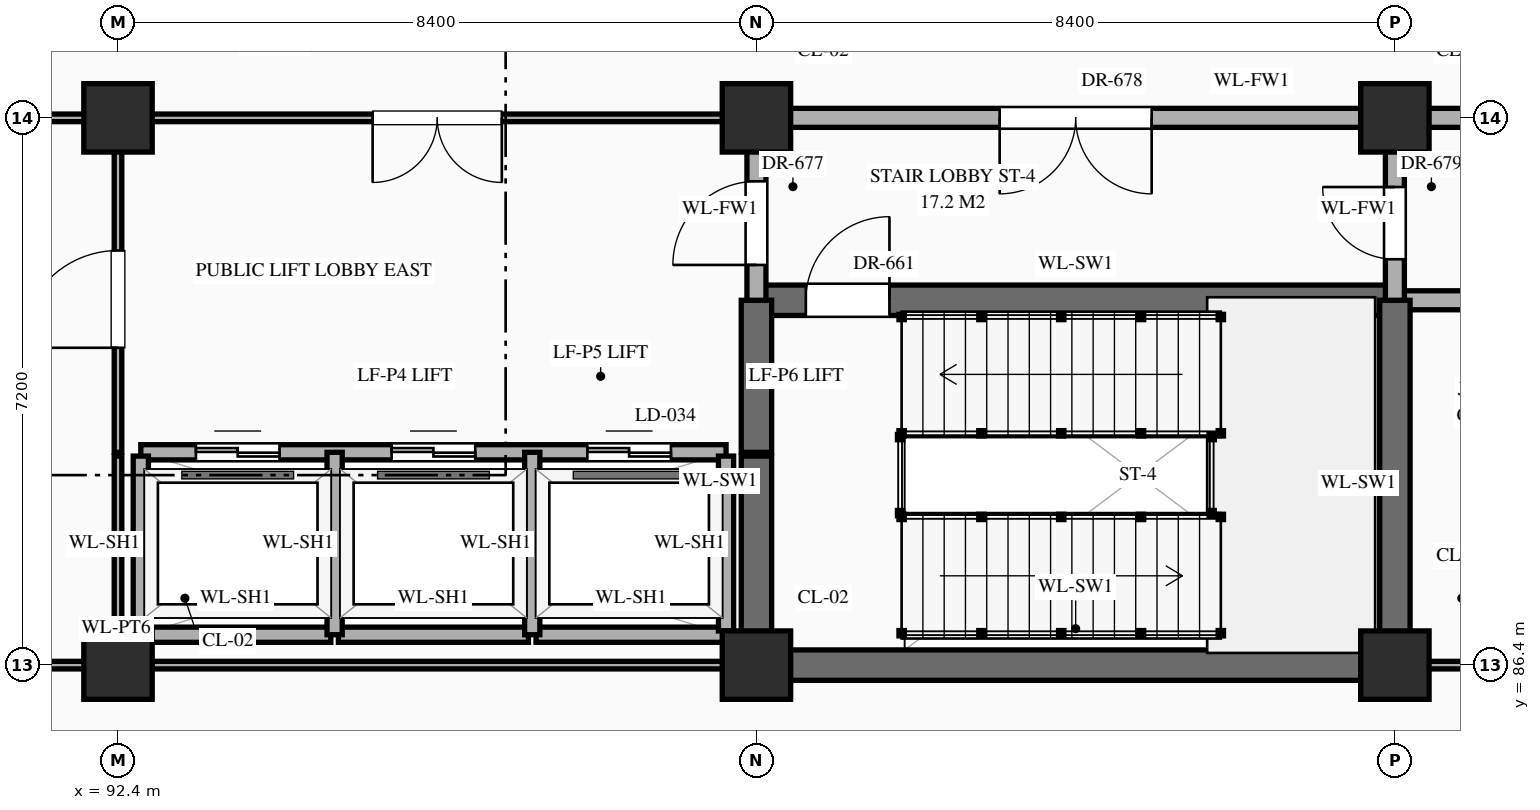
"""IFC4 building model, lengths in metres.
Left out: names, types, materials, properties, quantities, classifications, styles, units other than length and angle.
Written with IfcOpenShell. Run it as: python <this file> out.ifc"""

import sys

from ifc_helpers import new_model, si_unit, direction, frame, frame_2d, origin, origin_2d, place, context, subcontext, project, spatial, rectangle, extrude, element, fill, save


model = new_model("IFC4")
c1 = context("Model", 3, precision=1e-05, world=origin(), true_north=direction((0.0, 1.0)))
c2 = subcontext(c1, "Body", "Model", "MODEL_VIEW")
j1 = project(units=[si_unit("LENGTHUNIT", "METRE"), si_unit("PLANEANGLEUNIT", "RADIAN")], contexts=[c1])
p1 = place(None, origin())
s1 = spatial("IfcSite", under=j1, at=p1, CompositionType="ELEMENT")
p2 = place(p1, origin())
s2 = spatial("IfcBuilding", under=s1, at=p2, CompositionType="ELEMENT")
p3 = place(p2, origin())
s3 = spatial("IfcBuildingStorey", under=s2, at=p3, CompositionType="ELEMENT", Elevation=0.0)
for number, where, z_axis, x_axis in (
    (1, (92.4, 86.4, 0.0), (0.0, 0.0, 1.0), (1.0, 0.0, 0.0)),
    (2, (92.4, 93.6, 0.0), (0.0, 0.0, 1.0), (1.0, 0.0, 0.0)),
    (3, (100.8, 86.4, 0.0), (0.0, 0.0, 1.0), (1.0, 0.0, 0.0)),
    (4, (100.8, 93.6, 0.0), (0.0, 0.0, 1.0), (1.0, 0.0, 0.0)),
    (5, (109.2, 86.4, 0.0), (0.0, 0.0, 1.0), (1.0, 0.0, 0.0)),
    (6, (109.2, 93.6, 0.0), (0.0, 0.0, 1.0), (1.0, 0.0, 0.0)),
):
    element("IfcColumn", number, at=place(p3, frame(where, z_axis=z_axis, x_axis=x_axis)), inside=s3, PredefinedType="COLUMN", context=c2, shape_type="SweptSolid", body=[
        extrude(rectangle(XDim=0.9, YDim=0.9, at=origin_2d()), origin(), (0.0, 0.0, 1.0), 5.4),
    ])
p4 = place(p3, frame((84.0, 86.4, 0.0), z_axis=(0.0, 0.0, 1.0), x_axis=(1.0, 0.0, 0.0)))
e7 = element("IfcWall", 7, at=p4, inside=s3, PredefinedType="STANDARD", context=c2, shape_type="SweptSolid", body=[
    extrude(rectangle(XDim=8.4, YDim=0.1, at=frame_2d((4.2, 0.0))), origin(), (0.0, 0.0, 1.0), 4.27),
])
p5 = place(p4, frame((1.025, 0.0, 0.0)))
e8 = element("IfcOpeningElement", 8, at=p5, cuts=e7, PredefinedType="OPENING", context=c2, shape_type="SweptSolid", body=[
    extrude(rectangle(XDim=1.12, YDim=2.25, at=frame_2d((0.56, 1.125))), frame((0.0, 0.062, 0.0), z_axis=(0.0, -1.0, 0.0), x_axis=(1.0, 0.0, 0.0)), (0.0, 0.0, 1.0), 0.124),
])
p6 = place(p4, frame((3.6, 0.0, 0.0)))
e9 = element("IfcOpeningElement", 9, at=p6, cuts=e7, PredefinedType="OPENING", context=c2, shape_type="SweptSolid", body=[
    extrude(rectangle(XDim=1.2, YDim=2.35, at=frame_2d((0.6, 1.175))), frame((0.0, 0.062, 0.0), z_axis=(0.0, -1.0, 0.0), x_axis=(1.0, 0.0, 0.0)), (0.0, 0.0, 1.0), 0.124),
])
p7 = place(p4, frame((6.195, 0.0, 0.0)))
e10 = element("IfcOpeningElement", 10, at=p7, cuts=e7, PredefinedType="OPENING", context=c2, shape_type="SweptSolid", body=[
    extrude(rectangle(XDim=1.24, YDim=2.3, at=frame_2d((0.62, 1.15))), frame((0.0, 0.062, 0.0), z_axis=(0.0, -1.0, 0.0), x_axis=(1.0, 0.0, 0.0)), (0.0, 0.0, 1.0), 0.124),
])
p8 = place(p3, frame((92.45, 86.4, 0.0), z_axis=(0.0, 0.0, 1.0), x_axis=(1.0, 0.0, 0.0)))
e11 = element("IfcWall", 11, at=p8, inside=s3, PredefinedType="STANDARD", context=c2, shape_type="SweptSolid", body=[
    extrude(rectangle(XDim=8.3, YDim=0.1, at=frame_2d((4.15, 0.0))), origin(), (0.0, 0.0, 1.0), 4.27),
])
p9 = place(p3, frame((100.8, 86.4, 0.0), z_axis=(0.0, 0.0, 1.0), x_axis=(1.0, 0.0, 0.0)))
e12 = element("IfcWall", 12, at=p9, inside=s3, PredefinedType="SHEAR", context=c2, shape_type="SweptSolid", body=[
    extrude(rectangle(XDim=8.4, YDim=0.4, at=frame_2d((4.2, 0.0))), origin(), (0.0, 0.0, 1.0), 5.12),
])
p10 = place(p3, frame((109.2, 86.4, 0.0), z_axis=(0.0, 0.0, 1.0), x_axis=(1.0, 0.0, 0.0)))
e13 = element("IfcWall", 13, at=p10, inside=s3, PredefinedType="STANDARD", context=c2, shape_type="SweptSolid", body=[
    extrude(rectangle(XDim=2.8, YDim=0.1, at=frame_2d((1.4, 0.0))), origin(), (0.0, 0.0, 1.0), 4.27),
])
p11 = place(p10, frame((0.945, 0.0, 0.0)))
e14 = element("IfcOpeningElement", 14, at=p11, cuts=e13, PredefinedType="OPENING", context=c2, shape_type="SweptSolid", body=[
    extrude(rectangle(XDim=1.28, YDim=2.35, at=frame_2d((0.64, 1.175))), frame((0.0, 0.062, 0.0), z_axis=(0.0, -1.0, 0.0), x_axis=(1.0, 0.0, 0.0)), (0.0, 0.0, 1.0), 0.124),
])
for number, where, z_axis, x_axis in (
    (15, (92.7, 86.8, 0.0), (0.0, 0.0, 1.0), (1.0, 0.0, 0.0)),
    (16, (95.3, 86.8, 0.0), (0.0, 0.0, 1.0), (1.0, 0.0, 0.0)),
    (17, (97.9, 86.8, 0.0), (0.0, 0.0, 1.0), (1.0, 0.0, 0.0)),
):
    element("IfcWall", number, at=place(p3, frame(where, z_axis=z_axis, x_axis=x_axis)), inside=s3, PredefinedType="STANDARD", context=c2, shape_type="SweptSolid", body=[
        extrude(rectangle(XDim=2.5, YDim=0.2, at=frame_2d((1.25, 0.0))), origin(), (0.0, 0.0, 1.0), 5.12),
    ])
p12 = place(p3, frame((92.7, 89.2, 0.0), z_axis=(0.0, 0.0, 1.0), x_axis=(1.0, 0.0, 0.0)))
e18 = element("IfcWall", 18, at=p12, inside=s3, PredefinedType="STANDARD", context=c2, shape_type="SweptSolid", body=[
    extrude(rectangle(XDim=7.7, YDim=0.2, at=frame_2d((3.85, 0.0))), origin(), (0.0, 0.0, 1.0), 5.12),
])
p13 = place(p12, frame((0.725, 0.0, 0.0)))
e19 = element("IfcOpeningElement", 19, at=p13, cuts=e18, PredefinedType="OPENING", context=c2, shape_type="SweptSolid", body=[
    extrude(rectangle(XDim=1.1, YDim=2.15, at=frame_2d((0.55, 1.075))), frame((0.0, 0.112, 0.0), z_axis=(0.0, -1.0, 0.0), x_axis=(1.0, 0.0, 0.0)), (0.0, 0.0, 1.0), 0.224),
])
p14 = place(p12, frame((3.3, 0.0, 0.0)))
e20 = element("IfcOpeningElement", 20, at=p14, cuts=e18, PredefinedType="OPENING", context=c2, shape_type="SweptSolid", body=[
    extrude(rectangle(XDim=1.1, YDim=2.15, at=frame_2d((0.55, 1.075))), frame((0.0, 0.112, 0.0), z_axis=(0.0, -1.0, 0.0), x_axis=(1.0, 0.0, 0.0)), (0.0, 0.0, 1.0), 0.224),
])
p15 = place(p12, frame((5.875, 0.0, 0.0)))
e21 = element("IfcOpeningElement", 21, at=p15, cuts=e18, PredefinedType="OPENING", context=c2, shape_type="SweptSolid", body=[
    extrude(rectangle(XDim=1.1, YDim=2.15, at=frame_2d((0.55, 1.075))), frame((0.0, 0.112, 0.0), z_axis=(0.0, -1.0, 0.0), x_axis=(1.0, 0.0, 0.0)), (0.0, 0.0, 1.0), 0.224),
])
p16 = place(p3, frame((100.8, 91.2, 0.0), z_axis=(0.0, 0.0, 1.0), x_axis=(1.0, 0.0, 0.0)))
e22 = element("IfcWall", 22, at=p16, inside=s3, PredefinedType="SHEAR", context=c2, shape_type="SweptSolid", body=[
    extrude(rectangle(XDim=8.4, YDim=0.4, at=frame_2d((4.2, 0.0))), origin(), (0.0, 0.0, 1.0), 5.12),
])
p17 = place(p16, frame((0.65, 0.0, 0.0)))
e23 = element("IfcOpeningElement", 23, at=p17, cuts=e22, PredefinedType="OPENING", context=c2, shape_type="SweptSolid", body=[
    extrude(rectangle(XDim=1.1, YDim=2.2, at=frame_2d((0.55, 1.1))), frame((0.0, 0.212, 0.0), z_axis=(0.0, -1.0, 0.0), x_axis=(1.0, 0.0, 0.0)), (0.0, 0.0, 1.0), 0.424),
])
p18 = place(p3, frame((109.2, 91.2, 0.0), z_axis=(0.0, 0.0, 1.0), x_axis=(1.0, 0.0, 0.0)))
e24 = element("IfcWall", 24, at=p18, inside=s3, PredefinedType="STANDARD", context=c2, shape_type="SweptSolid", body=[
    extrude(rectangle(XDim=2.8, YDim=0.25, at=frame_2d((1.4, 0.0))), origin(), (0.0, 0.0, 1.0), 5.12),
])
p19 = place(p3, frame((67.2, 93.6, 0.0), z_axis=(0.0, 0.0, 1.0), x_axis=(1.0, 0.0, 0.0)))
e25 = element("IfcWall", 25, at=p19, inside=s3, PredefinedType="STANDARD", context=c2, shape_type="SweptSolid", body=[
    extrude(rectangle(XDim=33.6, YDim=0.1, at=frame_2d((16.8, 0.0))), origin(), (0.0, 0.0, 1.0), 4.27),
])
p20 = place(p19, frame((3.425, 0.0, 0.0)))
e26 = element("IfcOpeningElement", 26, at=p20, cuts=e25, PredefinedType="OPENING", context=c2, shape_type="SweptSolid", body=[
    extrude(rectangle(XDim=1.55, YDim=2.35, at=frame_2d((0.775, 1.175))), frame((0.0, 0.062, 0.0), z_axis=(0.0, -1.0, 0.0), x_axis=(1.0, 0.0, 0.0)), (0.0, 0.0, 1.0), 0.124),
])
p21 = place(p19, frame((28.55, 0.0, 0.0)))
e27 = element("IfcOpeningElement", 27, at=p21, cuts=e25, PredefinedType="OPENING", context=c2, shape_type="SweptSolid", body=[
    extrude(rectangle(XDim=1.7, YDim=2.45, at=frame_2d((0.85, 1.225))), frame((0.0, 0.062, 0.0), z_axis=(0.0, -1.0, 0.0), x_axis=(1.0, 0.0, 0.0)), (0.0, 0.0, 1.0), 0.124),
])
p22 = place(p19, frame((11.7, 0.0, 0.0)))
e28 = element("IfcOpeningElement", 28, at=p22, cuts=e25, PredefinedType="OPENING", context=c2, shape_type="SweptSolid", body=[
    extrude(rectangle(XDim=1.8, YDim=2.5, at=frame_2d((0.9, 1.25))), frame((0.0, 0.062, 0.0), z_axis=(0.0, -1.0, 0.0), x_axis=(1.0, 0.0, 0.0)), (0.0, 0.0, 1.0), 0.124),
])
p23 = place(p19, frame((17.885, 0.0, 0.0)))
e29 = element("IfcOpeningElement", 29, at=p23, cuts=e25, PredefinedType="OPENING", context=c2, shape_type="SweptSolid", body=[
    extrude(rectangle(XDim=1.0, YDim=2.25, at=frame_2d((0.5, 1.125))), frame((0.0, 0.062, 0.0), z_axis=(0.0, -1.0, 0.0), x_axis=(1.0, 0.0, 0.0)), (0.0, 0.0, 1.0), 0.124),
])
p24 = place(p19, frame((20.48, 0.0, 0.0)))
e30 = element("IfcOpeningElement", 30, at=p24, cuts=e25, PredefinedType="OPENING", context=c2, shape_type="SweptSolid", body=[
    extrude(rectangle(XDim=1.04, YDim=2.2, at=frame_2d((0.52, 1.1))), frame((0.0, 0.062, 0.0), z_axis=(0.0, -1.0, 0.0), x_axis=(1.0, 0.0, 0.0)), (0.0, 0.0, 1.0), 0.124),
])
p25 = place(p19, frame((23.075, 0.0, 0.0)))
e31 = element("IfcOpeningElement", 31, at=p25, cuts=e25, PredefinedType="OPENING", context=c2, shape_type="SweptSolid", body=[
    extrude(rectangle(XDim=1.08, YDim=2.25, at=frame_2d((0.54, 1.125))), frame((0.0, 0.062, 0.0), z_axis=(0.0, -1.0, 0.0), x_axis=(1.0, 0.0, 0.0)), (0.0, 0.0, 1.0), 0.124),
])
p26 = place(p3, frame((100.8, 93.6, 0.0), z_axis=(0.0, 0.0, 1.0), x_axis=(1.0, 0.0, 0.0)))
e32 = element("IfcWall", 32, at=p26, inside=s3, PredefinedType="STANDARD", context=c2, shape_type="SweptSolid", body=[
    extrude(rectangle(XDim=25.2, YDim=0.25, at=frame_2d((12.6, 0.0))), origin(), (0.0, 0.0, 1.0), 4.27),
])
p27 = place(p26, frame((3.2, 0.0, 0.0)))
e33 = element("IfcOpeningElement", 33, at=p27, cuts=e32, PredefinedType="OPENING", context=c2, shape_type="SweptSolid", body=[
    extrude(rectangle(XDim=2.0, YDim=2.4, at=frame_2d((1.0, 1.2))), frame((0.0, 0.137, 0.0), z_axis=(0.0, -1.0, 0.0), x_axis=(1.0, 0.0, 0.0)), (0.0, 0.0, 1.0), 0.274),
])
p28 = place(p26, frame((20.212, 0.0, 0.0)))
e34 = element("IfcOpeningElement", 34, at=p28, cuts=e32, PredefinedType="OPENING", context=c2, shape_type="SweptSolid", body=[
    extrude(rectangle(XDim=1.6, YDim=2.3, at=frame_2d((0.8, 1.15))), frame((0.0, 0.137, 0.0), z_axis=(0.0, -1.0, 0.0), x_axis=(1.0, 0.0, 0.0)), (0.0, 0.0, 1.0), 0.274),
])
p29 = place(p26, frame((9.485, 0.0, 0.0)))
e35 = element("IfcOpeningElement", 35, at=p29, cuts=e32, PredefinedType="OPENING", context=c2, shape_type="SweptSolid", body=[
    extrude(rectangle(XDim=1.0, YDim=2.2, at=frame_2d((0.5, 1.1))), frame((0.0, 0.137, 0.0), z_axis=(0.0, -1.0, 0.0), x_axis=(1.0, 0.0, 0.0)), (0.0, 0.0, 1.0), 0.274),
])
p30 = place(p26, frame((12.125, 0.0, 0.0)))
e36 = element("IfcOpeningElement", 36, at=p30, cuts=e32, PredefinedType="OPENING", context=c2, shape_type="SweptSolid", body=[
    extrude(rectangle(XDim=0.95, YDim=2.15, at=frame_2d((0.475, 1.075))), frame((0.0, 0.137, 0.0), z_axis=(0.0, -1.0, 0.0), x_axis=(1.0, 0.0, 0.0)), (0.0, 0.0, 1.0), 0.274),
])
p31 = place(p26, frame((14.665, 0.0, 0.0)))
e37 = element("IfcOpeningElement", 37, at=p31, cuts=e32, PredefinedType="OPENING", context=c2, shape_type="SweptSolid", body=[
    extrude(rectangle(XDim=1.1, YDim=2.2, at=frame_2d((0.55, 1.1))), frame((0.0, 0.137, 0.0), z_axis=(0.0, -1.0, 0.0), x_axis=(1.0, 0.0, 0.0)), (0.0, 0.0, 1.0), 0.274),
])
p32 = place(p3, frame((92.4, 86.45, 0.0), z_axis=(0.0, 0.0, 1.0), x_axis=(0.0, 1.0, 0.0)))
e38 = element("IfcWall", 38, at=p32, inside=s3, PredefinedType="STANDARD", context=c2, shape_type="SweptSolid", body=[
    extrude(rectangle(XDim=2.7, YDim=0.1, at=frame_2d((1.35, 0.0))), origin(), (0.0, 0.0, 1.0), 4.37),
])
p33 = place(p3, frame((92.4, 89.2, 0.0), z_axis=(0.0, 0.0, 1.0), x_axis=(0.0, 1.0, 0.0)))
e39 = element("IfcWall", 39, at=p33, inside=s3, PredefinedType="STANDARD", context=c2, shape_type="SweptSolid", body=[
    extrude(rectangle(XDim=4.4, YDim=0.1, at=frame_2d((2.2, 0.0))), origin(), (0.0, 0.0, 1.0), 4.37),
])
p34 = place(p33, frame((1.375, 0.0, 0.0)))
e40 = element("IfcOpeningElement", 40, at=p34, cuts=e39, PredefinedType="OPENING", context=c2, shape_type="SweptSolid", body=[
    extrude(rectangle(XDim=1.28, YDim=2.35, at=frame_2d((0.64, 1.175))), frame((0.0, 0.062, 0.0), z_axis=(0.0, -1.0, 0.0), x_axis=(1.0, 0.0, 0.0)), (0.0, 0.0, 1.0), 0.124),
])
p35 = place(p3, frame((92.7, 86.85, 0.0), z_axis=(0.0, 0.0, 1.0), x_axis=(0.0, 1.0, 0.0)))
e41 = element("IfcWall", 41, at=p35, inside=s3, PredefinedType="STANDARD", context=c2, shape_type="SweptSolid", body=[
    extrude(rectangle(XDim=2.3, YDim=0.2, at=frame_2d((1.15, 0.0))), origin(), (0.0, 0.0, 1.0), 5.12),
])
for number, where, z_axis, x_axis in (
    (42, (95.25, 86.8, 0.0), (0.0, 0.0, 1.0), (0.0, 1.0, 0.0)),
    (43, (97.85, 86.8, 0.0), (0.0, 0.0, 1.0), (0.0, 1.0, 0.0)),
):
    element("IfcWall", number, at=place(p3, frame(where, z_axis=z_axis, x_axis=x_axis)), inside=s3, PredefinedType="STANDARD", context=c2, shape_type="SweptSolid", body=[
        extrude(rectangle(XDim=2.4, YDim=0.2, at=frame_2d((1.2, 0.0))), origin(), (0.0, 0.0, 1.0), 5.12),
    ])
p36 = place(p3, frame((100.4, 86.85, 0.0), z_axis=(0.0, 0.0, 1.0), x_axis=(0.0, 1.0, 0.0)))
e44 = element("IfcWall", 44, at=p36, inside=s3, PredefinedType="STANDARD", context=c2, shape_type="SweptSolid", body=[
    extrude(rectangle(XDim=2.3, YDim=0.2, at=frame_2d((1.15, 0.0))), origin(), (0.0, 0.0, 1.0), 5.12),
])
p37 = place(p3, frame((100.8, 86.45, 0.0), z_axis=(0.0, 0.0, 1.0), x_axis=(0.0, 1.0, 0.0)))
e45 = element("IfcWall", 45, at=p37, inside=s3, PredefinedType="SHEAR", context=c2, shape_type="SweptSolid", body=[
    extrude(rectangle(XDim=2.7, YDim=0.4, at=frame_2d((1.35, 0.0))), origin(), (0.0, 0.0, 1.0), 5.12),
])
p38 = place(p3, frame((100.8, 89.2, 0.0), z_axis=(0.0, 0.0, 1.0), x_axis=(0.0, 1.0, 0.0)))
e46 = element("IfcWall", 46, at=p38, inside=s3, PredefinedType="SHEAR", context=c2, shape_type="SweptSolid", body=[
    extrude(rectangle(XDim=2.0, YDim=0.4, at=frame_2d((1.0, 0.0))), origin(), (0.0, 0.0, 1.0), 5.12),
])
p39 = place(p3, frame((100.8, 91.2, 0.0), z_axis=(0.0, 0.0, 1.0), x_axis=(0.0, 1.0, 0.0)))
e47 = element("IfcWall", 47, at=p39, inside=s3, PredefinedType="STANDARD", context=c2, shape_type="SweptSolid", body=[
    extrude(rectangle(XDim=2.4, YDim=0.25, at=frame_2d((1.2, 0.0))), origin(), (0.0, 0.0, 1.0), 4.37),
])
p40 = place(p39, frame((0.465, 0.0, 0.0)))
e48 = element("IfcOpeningElement", 48, at=p40, cuts=e47, PredefinedType="OPENING", context=c2, shape_type="SweptSolid", body=[
    extrude(rectangle(XDim=1.1, YDim=2.2, at=frame_2d((0.55, 1.1))), frame((0.0, 0.137, 0.0), z_axis=(0.0, -1.0, 0.0), x_axis=(1.0, 0.0, 0.0)), (0.0, 0.0, 1.0), 0.274),
])
p41 = place(p3, frame((109.2, 86.4, 0.0), z_axis=(0.0, 0.0, 1.0), x_axis=(0.0, 1.0, 0.0)))
e49 = element("IfcWall", 49, at=p41, inside=s3, PredefinedType="SHEAR", context=c2, shape_type="SweptSolid", body=[
    extrude(rectangle(XDim=4.8, YDim=0.4, at=frame_2d((2.4, 0.0))), origin(), (0.0, 0.0, 1.0), 5.12),
])
p42 = place(p3, frame((109.2, 91.2, 0.0), z_axis=(0.0, 0.0, 1.0), x_axis=(0.0, 1.0, 0.0)))
e50 = element("IfcWall", 50, at=p42, inside=s3, PredefinedType="STANDARD", context=c2, shape_type="SweptSolid", body=[
    extrude(rectangle(XDim=2.4, YDim=0.25, at=frame_2d((1.2, 0.0))), origin(), (0.0, 0.0, 1.0), 4.37),
])
p43 = place(p42, frame((0.54, 0.0, 0.0)))
e51 = element("IfcOpeningElement", 51, at=p43, cuts=e50, PredefinedType="OPENING", context=c2, shape_type="SweptSolid", body=[
    extrude(rectangle(XDim=0.95, YDim=2.15, at=frame_2d((0.475, 1.075))), frame((0.0, 0.137, 0.0), z_axis=(0.0, -1.0, 0.0), x_axis=(1.0, 0.0, 0.0)), (0.0, 0.0, 1.0), 0.274),
])
p44 = place(p13, origin())
e52 = element("IfcDoor", 52, at=p44, inside=s3, OperationType="DOUBLE_DOOR_SLIDING", PredefinedType="DOOR", context=c2, shape_type="SweptSolid", body=[
    extrude(rectangle(XDim=1.1, YDim=2.15, at=frame_2d((0.55, 1.075))), frame((0.0, 0.025, 0.0), z_axis=(0.0, -1.0, 0.0), x_axis=(1.0, 0.0, 0.0)), (0.0, 0.0, 1.0), 0.05),
])
fill(e19, e52)
p45 = place(p14, origin())
e53 = element("IfcDoor", 53, at=p45, inside=s3, OperationType="DOUBLE_DOOR_SLIDING", PredefinedType="DOOR", context=c2, shape_type="SweptSolid", body=[
    extrude(rectangle(XDim=1.1, YDim=2.15, at=frame_2d((0.55, 1.075))), frame((0.0, 0.025, 0.0), z_axis=(0.0, -1.0, 0.0), x_axis=(1.0, 0.0, 0.0)), (0.0, 0.0, 1.0), 0.05),
])
fill(e20, e53)
p46 = place(p15, origin())
e54 = element("IfcDoor", 54, at=p46, inside=s3, OperationType="DOUBLE_DOOR_SLIDING", PredefinedType="DOOR", context=c2, shape_type="SweptSolid", body=[
    extrude(rectangle(XDim=1.1, YDim=2.15, at=frame_2d((0.55, 1.075))), frame((0.0, 0.025, 0.0), z_axis=(0.0, -1.0, 0.0), x_axis=(1.0, 0.0, 0.0)), (0.0, 0.0, 1.0), 0.05),
])
fill(e21, e54)
p47 = place(p17, origin())
e55 = element("IfcDoor", 55, at=p47, inside=s3, OperationType="SINGLE_SWING_RIGHT", PredefinedType="DOOR", context=c2, shape_type="SweptSolid", body=[
    extrude(rectangle(XDim=1.1, YDim=2.2, at=frame_2d((0.55, 1.1))), frame((0.0, 0.025, 0.0), z_axis=(0.0, -1.0, 0.0), x_axis=(1.0, 0.0, 0.0)), (0.0, 0.0, 1.0), 0.05),
])
fill(e23, e55)
p48 = place(p40, origin())
e56 = element("IfcDoor", 56, at=p48, inside=s3, OperationType="SINGLE_SWING_LEFT", PredefinedType="DOOR", context=c2, shape_type="SweptSolid", body=[
    extrude(rectangle(XDim=1.1, YDim=2.2, at=frame_2d((0.55, 1.1))), frame((0.0, 0.025, 0.0), z_axis=(0.0, -1.0, 0.0), x_axis=(1.0, 0.0, 0.0)), (0.0, 0.0, 1.0), 0.05),
])
fill(e48, e56)
p49 = place(p27, frame((2.0, 0.0, 0.0), z_axis=(0.0, 0.0, 1.0), x_axis=(-1.0, 0.0, 0.0)))
e57 = element("IfcDoor", 57, at=p49, inside=s3, OperationType="DOUBLE_DOOR_SINGLE_SWING", PredefinedType="DOOR", context=c2, shape_type="SweptSolid", body=[
    extrude(rectangle(XDim=2.0, YDim=2.4, at=frame_2d((1.0, 1.2))), frame((0.0, 0.025, 0.0), z_axis=(0.0, -1.0, 0.0), x_axis=(1.0, 0.0, 0.0)), (0.0, 0.0, 1.0), 0.05),
])
fill(e33, e57)
p50 = place(p43, origin())
e58 = element("IfcDoor", 58, at=p50, inside=s3, OperationType="SINGLE_SWING_RIGHT", PredefinedType="DOOR", context=c2, shape_type="SweptSolid", body=[
    extrude(rectangle(XDim=0.95, YDim=2.15, at=frame_2d((0.475, 1.075))), frame((0.0, 0.025, 0.0), z_axis=(0.0, -1.0, 0.0), x_axis=(1.0, 0.0, 0.0)), (0.0, 0.0, 1.0), 0.05),
])
fill(e51, e58)
p51 = place(p21, frame((1.7, 0.0, 0.0), z_axis=(0.0, 0.0, 1.0), x_axis=(-1.0, 0.0, 0.0)))
e59 = element("IfcDoor", 59, at=p51, inside=s3, OperationType="DOUBLE_DOOR_SINGLE_SWING", PredefinedType="DOOR", context=c2, shape_type="SweptSolid", body=[
    extrude(rectangle(XDim=1.7, YDim=2.45, at=frame_2d((0.85, 1.225))), frame((0.0, 0.025, 0.0), z_axis=(0.0, -1.0, 0.0), x_axis=(1.0, 0.0, 0.0)), (0.0, 0.0, 1.0), 0.05),
])
fill(e27, e59)
p52 = place(p34, origin())
e60 = element("IfcDoor", 60, at=p52, inside=s3, OperationType="SINGLE_SWING_LEFT", PredefinedType="DOOR", context=c2, shape_type="SweptSolid", body=[
    extrude(rectangle(XDim=1.28, YDim=2.35, at=frame_2d((0.64, 1.175))), frame((0.0, 0.025, 0.0), z_axis=(0.0, -1.0, 0.0), x_axis=(1.0, 0.0, 0.0)), (0.0, 0.0, 1.0), 0.05),
])
fill(e40, e60)
save(model, sys.argv[1])
